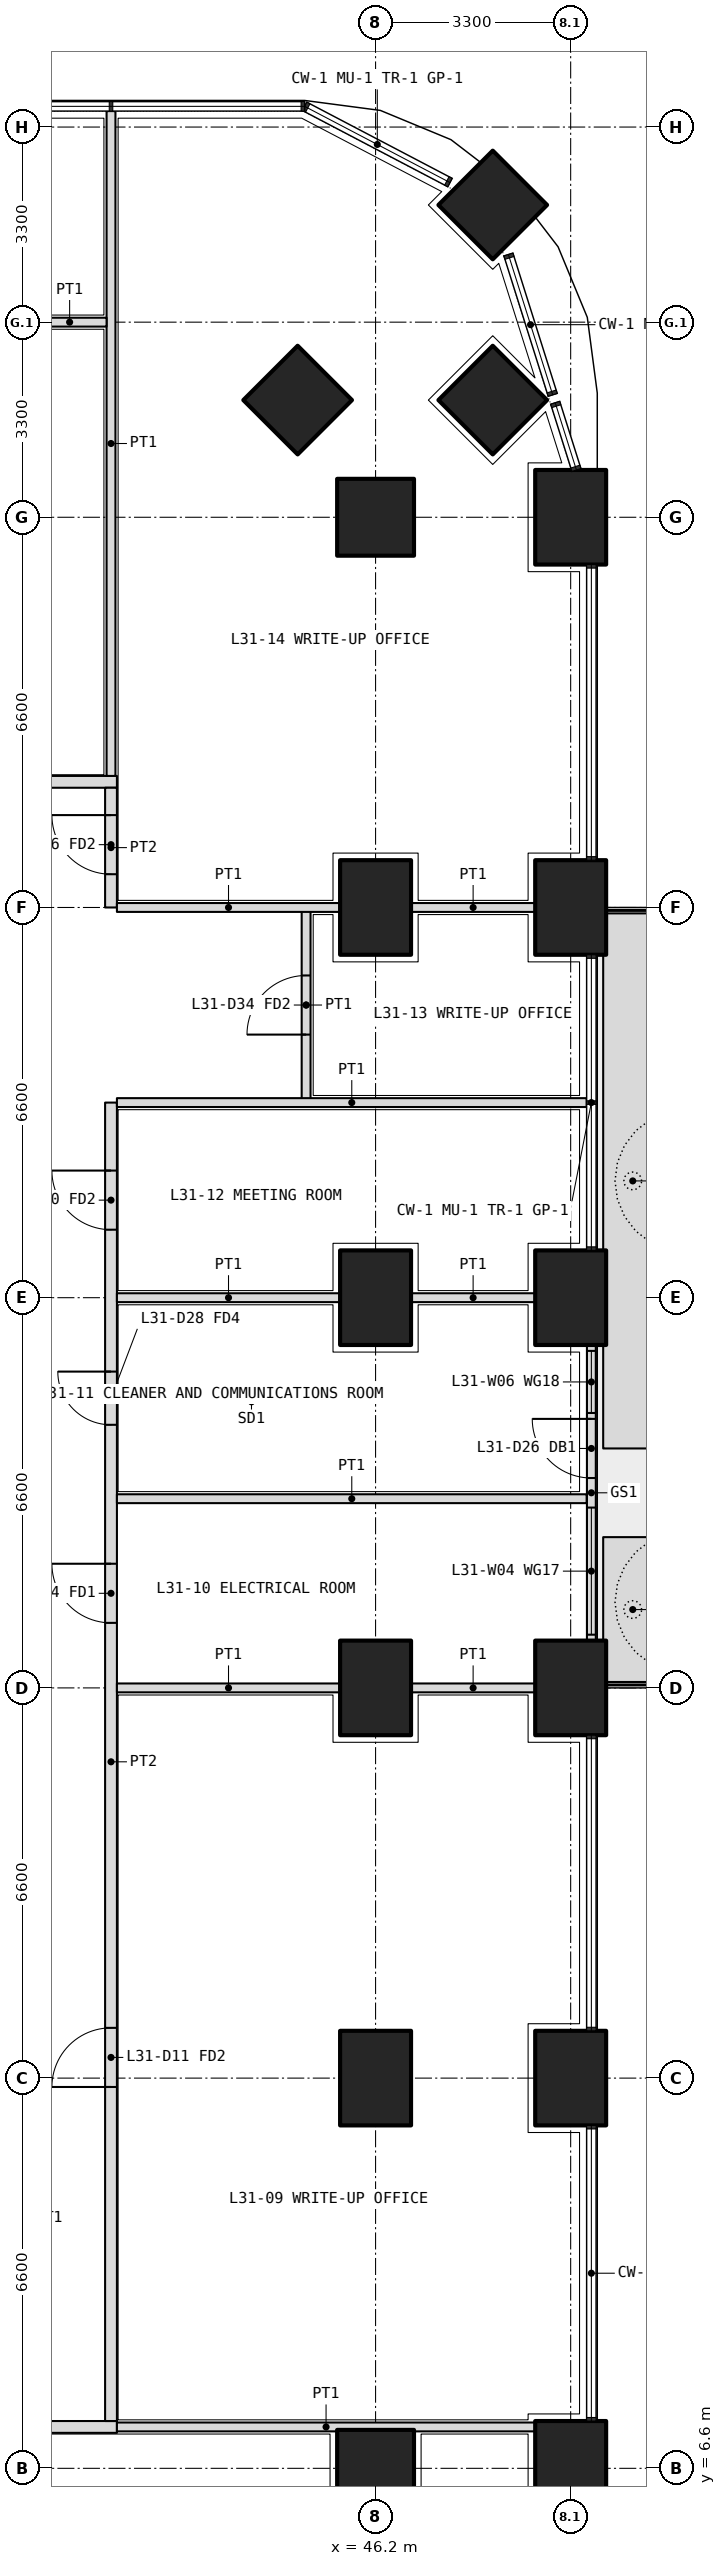
"""IFC4 building model, lengths in metres.
Left out: names, types, materials, properties, quantities, classifications, styles, units other than length and angle.
Written with IfcOpenShell. Run it as: python <this file> out.ifc"""

import sys

from ifc_helpers import new_model, si_unit, direction, frame, frame_2d, origin, origin_2d, place, context, subcontext, project, spatial, polyline, rectangle, outline, extrude, element, fill, save


model = new_model("IFC4")
c1 = context("Model", 3, precision=1e-05, world=origin(), true_north=direction((0.0, 1.0)))
c2 = subcontext(c1, "Body", "Model", "MODEL_VIEW")
j1 = project(units=[si_unit("LENGTHUNIT", "METRE"), si_unit("PLANEANGLEUNIT", "RADIAN")], contexts=[c1])
p1 = place(None, origin())
s1 = spatial("IfcSite", under=j1, at=p1, CompositionType="ELEMENT")
p2 = place(p1, origin())
s2 = spatial("IfcBuilding", under=s1, at=p2, CompositionType="ELEMENT")
p3 = place(p2, frame((0.0, 0.0, 136.8)))
s3 = spatial("IfcBuildingStorey", under=s2, at=p3, CompositionType="ELEMENT", Elevation=136.8)
p4 = place(p3, frame((48.182, 44.882, 0.0), z_axis=(0.0, 0.0, 1.0), x_axis=(0.707106781187, 0.707106781187, 0.0)))
e1 = element("IfcColumn", 1, at=p4, inside=s3, PredefinedType="COLUMN", context=c2, shape_type="SweptSolid", body=[
    extrude(rectangle(XDim=1.3, YDim=1.3, at=origin_2d()), origin(), (0.0, 0.0, 1.0), 4.2),
])
for number, where, z_axis, x_axis in (
    (2, (49.5, 6.6, 0.0), (0.0, 0.0, 1.0), (0.0, 1.0, 0.0)),
    (3, (49.5, 13.2, 0.0), (0.0, 0.0, 1.0), (0.0, 1.0, 0.0)),
    (4, (49.5, 19.8, 0.0), (0.0, 0.0, 1.0), (0.0, 1.0, 0.0)),
    (5, (49.5, 26.4, 0.0), (0.0, 0.0, 1.0), (0.0, 1.0, 0.0)),
    (6, (49.5, 33.0, 0.0), (0.0, 0.0, 1.0), (0.0, 1.0, 0.0)),
    (7, (49.5, 39.6, 0.0), (0.0, 0.0, 1.0), (0.0, 1.0, 0.0)),
):
    element("IfcColumn", number, at=place(p3, frame(where, z_axis=z_axis, x_axis=x_axis)), inside=s3, PredefinedType="COLUMN", context=c2, shape_type="SweptSolid", body=[
        extrude(rectangle(XDim=1.6, YDim=1.2, at=origin_2d()), origin(), (0.0, 0.0, 1.0), 4.2),
    ])
for number, where, z_axis, x_axis in (
    (8, (46.2, 6.6, 0.0), (0.0, 0.0, 1.0), (1.0, 0.0, 0.0)),
    (9, (46.2, 39.6, 0.0), (0.0, 0.0, 1.0), (1.0, 0.0, 0.0)),
    (10, (48.182, 41.582, 0.0), (0.0, 0.0, 1.0), (0.707, 0.707, 0.0)),
    (11, (44.882, 41.582, 0.0), (0.0, 0.0, 1.0), (0.707, 0.707, 0.0)),
):
    element("IfcColumn", number, at=place(p3, frame(where, z_axis=z_axis, x_axis=x_axis)), inside=s3, PredefinedType="COLUMN", context=c2, shape_type="SweptSolid", body=[
        extrude(rectangle(XDim=1.3, YDim=1.3, at=origin_2d()), origin(), (0.0, 0.0, 1.0), 4.2),
    ])
for number, where, z_axis, x_axis in (
    (12, (46.2, 13.2, 0.0), (0.0, 0.0, 1.0), (0.0, 1.0, 0.0)),
    (13, (46.2, 19.8, 0.0), (0.0, 0.0, 1.0), (0.0, 1.0, 0.0)),
    (14, (46.2, 26.4, 0.0), (0.0, 0.0, 1.0), (0.0, 1.0, 0.0)),
    (15, (46.2, 33.0, 0.0), (0.0, 0.0, 1.0), (0.0, 1.0, 0.0)),
):
    element("IfcColumn", number, at=place(p3, frame(where, z_axis=z_axis, x_axis=x_axis)), inside=s3, PredefinedType="COLUMN", context=c2, shape_type="SweptSolid", body=[
        extrude(rectangle(XDim=1.6, YDim=1.2, at=origin_2d()), origin(), (0.0, 0.0, 1.0), 4.2),
    ])
p5 = place(p3, origin())
e16 = element("IfcWall", 16, at=p5, inside=s3, PredefinedType="USERDEFINED", context=c2, shape_type="SweptSolid", body=[
    extrude(outline(polyline([(50.05, 19.9), (51.05, 19.9), (51.05, 22.35), (50.05, 22.35), (50.05, 19.9)]), holes=[polyline([(50.2, 20.05), (50.9, 20.05), (50.9, 22.2), (50.2, 22.2), (50.2, 20.05)])]), origin(), (0.0, 0.0, 1.0), 1.05),
])
p6 = place(p3, origin())
e17 = element("IfcWall", 17, at=p6, inside=s3, PredefinedType="USERDEFINED", context=c2, shape_type="SweptSolid", body=[
    extrude(outline(polyline([(50.05, 23.85), (51.05, 23.85), (51.05, 32.9), (50.05, 32.9), (50.05, 23.85)]), holes=[polyline([(50.2, 24.0), (50.9, 24.0), (50.9, 32.75), (50.2, 32.75), (50.2, 24.0)])]), origin(), (0.0, 0.0, 1.0), 1.05),
])
p7 = place(p3, frame((49.85, 20.6, 0.0), z_axis=(0.0, 0.0, 1.0), x_axis=(0.0, 1.0, 0.0)))
e18 = element("IfcWall", 18, at=p7, inside=s3, PredefinedType="SOLIDWALL", context=c2, shape_type="SweptSolid", body=[
    extrude(rectangle(XDim=5.0, YDim=0.15, at=frame_2d((2.5, 0.0))), origin(), (0.0, 0.0, 1.0), 2.6),
])
p8 = place(p7, frame((2.75, 0.0, 0.0)))
e19 = element("IfcOpeningElement", 19, at=p8, cuts=e18, PredefinedType="OPENING", context=c2, shape_type="SweptSolid", body=[
    extrude(rectangle(XDim=1.0, YDim=2.4, at=frame_2d((0.5, 1.2))), frame((0.0, 0.085, 0.0), z_axis=(0.0, -1.0, 0.0), x_axis=(1.0, 0.0, 0.0)), (0.0, 0.0, 1.0), 0.17),
])
p9 = place(p7, frame((0.1, 0.0, 0.1)))
e20 = element("IfcOpeningElement", 20, at=p9, cuts=e18, PredefinedType="OPENING", context=c2, shape_type="SweptSolid", body=[
    extrude(rectangle(XDim=2.15, YDim=2.2, at=frame_2d((1.075, 1.1))), frame((0.0, 0.085, 0.0), z_axis=(0.0, -1.0, 0.0), x_axis=(1.0, 0.0, 0.0)), (0.0, 0.0, 1.0), 0.17),
])
p10 = place(p7, frame((3.85, 0.0, 0.1)))
e21 = element("IfcOpeningElement", 21, at=p10, cuts=e18, PredefinedType="OPENING", context=c2, shape_type="SweptSolid", body=[
    extrude(rectangle(XDim=1.05, YDim=2.2, at=frame_2d((0.525, 1.1))), frame((0.0, 0.085, 0.0), z_axis=(0.0, -1.0, 0.0), x_axis=(1.0, 0.0, 0.0)), (0.0, 0.0, 1.0), 0.17),
])
p11 = place(p3, frame((10.975, 7.3, 0.0), z_axis=(0.0, 0.0, 1.0), x_axis=(1.0, 0.0, 0.0)))
e22 = element("IfcWall", 22, at=p11, inside=s3, PredefinedType="PARTITIONING", context=c2, shape_type="SweptSolid", body=[
    extrude(rectangle(XDim=30.85, YDim=0.2, at=frame_2d((15.425, 0.0))), origin(), (0.0, 0.0, 1.0), 2.85),
])
p12 = place(p11, frame((3.962, 0.0, 0.0)))
e23 = element("IfcOpeningElement", 23, at=p12, cuts=e22, PredefinedType="OPENING", context=c2, shape_type="SweptSolid", body=[
    extrude(rectangle(XDim=1.0, YDim=2.1, at=frame_2d((0.5, 1.05))), frame((0.0, 0.11, 0.0), z_axis=(0.0, -1.0, 0.0), x_axis=(1.0, 0.0, 0.0)), (0.0, 0.0, 1.0), 0.22),
])
p13 = place(p11, frame((13.275, 0.0, 0.0)))
e24 = element("IfcOpeningElement", 24, at=p13, cuts=e22, PredefinedType="OPENING", context=c2, shape_type="SweptSolid", body=[
    extrude(rectangle(XDim=1.0, YDim=2.1, at=frame_2d((0.5, 1.05))), frame((0.0, 0.11, 0.0), z_axis=(0.0, -1.0, 0.0), x_axis=(1.0, 0.0, 0.0)), (0.0, 0.0, 1.0), 0.22),
])
p14 = place(p11, frame((21.525, 0.0, 0.0)))
e25 = element("IfcOpeningElement", 25, at=p14, cuts=e22, PredefinedType="OPENING", context=c2, shape_type="SweptSolid", body=[
    extrude(rectangle(XDim=1.0, YDim=2.1, at=frame_2d((0.5, 1.05))), frame((0.0, 0.11, 0.0), z_axis=(0.0, -1.0, 0.0), x_axis=(1.0, 0.0, 0.0)), (0.0, 0.0, 1.0), 0.22),
])
p15 = place(p11, frame((27.438, 0.0, 0.0)))
e26 = element("IfcOpeningElement", 26, at=p15, cuts=e22, PredefinedType="OPENING", context=c2, shape_type="SweptSolid", body=[
    extrude(rectangle(XDim=1.2, YDim=2.1, at=frame_2d((0.6, 1.05))), frame((0.0, 0.11, 0.0), z_axis=(0.0, -1.0, 0.0), x_axis=(1.0, 0.0, 0.0)), (0.0, 0.0, 1.0), 0.22),
])
p16 = place(p3, frame((10.975, 35.125, 0.0), z_axis=(0.0, 0.0, 1.0), x_axis=(1.0, 0.0, 0.0)))
e27 = element("IfcWall", 27, at=p16, inside=s3, PredefinedType="PARTITIONING", context=c2, shape_type="SweptSolid", body=[
    extrude(rectangle(XDim=30.85, YDim=0.2, at=frame_2d((15.425, 0.0))), origin(), (0.0, 0.0, 1.0), 2.85),
])
p17 = place(p16, frame((2.312, 0.0, 0.0)))
e28 = element("IfcOpeningElement", 28, at=p17, cuts=e27, PredefinedType="OPENING", context=c2, shape_type="SweptSolid", body=[
    extrude(rectangle(XDim=1.0, YDim=2.1, at=frame_2d((0.5, 1.05))), frame((0.0, 0.11, 0.0), z_axis=(0.0, -1.0, 0.0), x_axis=(1.0, 0.0, 0.0)), (0.0, 0.0, 1.0), 0.22),
])
p18 = place(p16, frame((8.325, 0.0, 0.0)))
e29 = element("IfcOpeningElement", 29, at=p18, cuts=e27, PredefinedType="OPENING", context=c2, shape_type="SweptSolid", body=[
    extrude(rectangle(XDim=1.0, YDim=2.1, at=frame_2d((0.5, 1.05))), frame((0.0, 0.11, 0.0), z_axis=(0.0, -1.0, 0.0), x_axis=(1.0, 0.0, 0.0)), (0.0, 0.0, 1.0), 0.22),
])
p19 = place(p16, frame((13.375, 0.0, 0.0)))
e30 = element("IfcOpeningElement", 30, at=p19, cuts=e27, PredefinedType="OPENING", context=c2, shape_type="SweptSolid", body=[
    extrude(rectangle(XDim=1.0, YDim=2.1, at=frame_2d((0.5, 1.05))), frame((0.0, 0.11, 0.0), z_axis=(0.0, -1.0, 0.0), x_axis=(1.0, 0.0, 0.0)), (0.0, 0.0, 1.0), 0.22),
])
p20 = place(p16, frame((16.675, 0.0, 0.0)))
e31 = element("IfcOpeningElement", 31, at=p20, cuts=e27, PredefinedType="OPENING", context=c2, shape_type="SweptSolid", body=[
    extrude(rectangle(XDim=1.0, YDim=2.1, at=frame_2d((0.5, 1.05))), frame((0.0, 0.11, 0.0), z_axis=(0.0, -1.0, 0.0), x_axis=(1.0, 0.0, 0.0)), (0.0, 0.0, 1.0), 0.22),
])
p21 = place(p16, frame((24.238, 0.0, 0.0)))
e32 = element("IfcOpeningElement", 32, at=p21, cuts=e27, PredefinedType="OPENING", context=c2, shape_type="SweptSolid", body=[
    extrude(rectangle(XDim=1.0, YDim=2.1, at=frame_2d((0.5, 1.05))), frame((0.0, 0.11, 0.0), z_axis=(0.0, -1.0, 0.0), x_axis=(1.0, 0.0, 0.0)), (0.0, 0.0, 1.0), 0.22),
])
p22 = place(p3, frame((41.725, 7.4, 0.0), z_axis=(0.0, 0.0, 1.0), x_axis=(0.0, 1.0, 0.0)))
e33 = element("IfcWall", 33, at=p22, inside=s3, PredefinedType="PARTITIONING", context=c2, shape_type="SweptSolid", body=[
    extrude(rectangle(XDim=22.3, YDim=0.2, at=frame_2d((11.15, 0.0))), origin(), (0.0, 0.0, 1.0), 2.85),
])
p23 = place(p22, frame((5.65, 0.0, 0.0)))
e34 = element("IfcOpeningElement", 34, at=p23, cuts=e33, PredefinedType="OPENING", context=c2, shape_type="SweptSolid", body=[
    extrude(rectangle(XDim=1.0, YDim=2.1, at=frame_2d((0.5, 1.05))), frame((0.0, 0.11, 0.0), z_axis=(0.0, -1.0, 0.0), x_axis=(1.0, 0.0, 0.0)), (0.0, 0.0, 1.0), 0.22),
])
p24 = place(p22, frame((13.5, 0.0, 0.0)))
e35 = element("IfcOpeningElement", 35, at=p24, cuts=e33, PredefinedType="OPENING", context=c2, shape_type="SweptSolid", body=[
    extrude(rectangle(XDim=1.0, YDim=2.1, at=frame_2d((0.5, 1.05))), frame((0.0, 0.11, 0.0), z_axis=(0.0, -1.0, 0.0), x_axis=(1.0, 0.0, 0.0)), (0.0, 0.0, 1.0), 0.22),
])
p25 = place(p22, frame((16.85, 0.0, 0.0)))
e36 = element("IfcOpeningElement", 36, at=p25, cuts=e33, PredefinedType="OPENING", context=c2, shape_type="SweptSolid", body=[
    extrude(rectangle(XDim=0.9, YDim=2.1, at=frame_2d((0.45, 1.05))), frame((0.0, 0.11, 0.0), z_axis=(0.0, -1.0, 0.0), x_axis=(1.0, 0.0, 0.0)), (0.0, 0.0, 1.0), 0.22),
])
p26 = place(p22, frame((20.15, 0.0, 0.0)))
e37 = element("IfcOpeningElement", 37, at=p26, cuts=e33, PredefinedType="OPENING", context=c2, shape_type="SweptSolid", body=[
    extrude(rectangle(XDim=1.0, YDim=2.1, at=frame_2d((0.5, 1.05))), frame((0.0, 0.11, 0.0), z_axis=(0.0, -1.0, 0.0), x_axis=(1.0, 0.0, 0.0)), (0.0, 0.0, 1.0), 0.22),
])
p27 = place(p3, frame((41.725, 33.0, 0.0), z_axis=(0.0, 0.0, 1.0), x_axis=(0.0, 1.0, 0.0)))
e38 = element("IfcWall", 38, at=p27, inside=s3, PredefinedType="PARTITIONING", context=c2, shape_type="SweptSolid", body=[
    extrude(rectangle(XDim=2.025, YDim=0.2, at=frame_2d((1.012, 0.0))), origin(), (0.0, 0.0, 1.0), 2.85),
])
p28 = place(p27, frame((0.562, 0.0, 0.0)))
e39 = element("IfcOpeningElement", 39, at=p28, cuts=e38, PredefinedType="OPENING", context=c2, shape_type="SweptSolid", body=[
    extrude(rectangle(XDim=1.0, YDim=2.1, at=frame_2d((0.5, 1.05))), frame((0.0, 0.11, 0.0), z_axis=(0.0, -1.0, 0.0), x_axis=(1.0, 0.0, 0.0)), (0.0, 0.0, 1.0), 0.22),
])
p29 = place(p3, frame((48.9, 7.3, 0.0), z_axis=(0.0, 0.0, 1.0), x_axis=(-1.0, 0.0, 0.0)))
e40 = element("IfcWall", 40, at=p29, inside=s3, PredefinedType="PARTITIONING", context=c2, shape_type="SweptSolid", body=[
    extrude(rectangle(XDim=7.075, YDim=0.15, at=frame_2d((3.538, 0.0))), origin(), (0.0, 0.0, 1.0), 2.85),
])
p30 = place(p3, frame((41.725, 46.47, 0.0), z_axis=(0.0, 0.0, 1.0), x_axis=(0.0, -1.0, 0.0)))
e41 = element("IfcWall", 41, at=p30, inside=s3, PredefinedType="PARTITIONING", context=c2, shape_type="SweptSolid", body=[
    extrude(rectangle(XDim=11.245, YDim=0.15, at=frame_2d((5.623, 0.0))), origin(), (0.0, 0.0, 1.0), 2.6),
])
p31 = place(p3, frame((49.77, 23.0, 0.0), z_axis=(0.0, 0.0, 1.0), x_axis=(-1.0, 0.0, 0.0)))
e42 = element("IfcWall", 42, at=p31, inside=s3, PredefinedType="PARTITIONING", context=c2, shape_type="SweptSolid", body=[
    extrude(rectangle(XDim=7.945, YDim=0.15, at=frame_2d((3.973, 0.0))), origin(), (0.0, 0.0, 1.0), 2.6),
])
p32 = place(p3, frame((48.9, 26.4, 0.0), z_axis=(0.0, 0.0, 1.0), x_axis=(-1.0, 0.0, 0.0)))
e43 = element("IfcWall", 43, at=p32, inside=s3, PredefinedType="PARTITIONING", context=c2, shape_type="SweptSolid", body=[
    extrude(rectangle(XDim=2.1, YDim=0.15, at=frame_2d((1.05, 0.0))), origin(), (0.0, 0.0, 1.0), 2.85),
])
p33 = place(p3, frame((45.6, 26.4, 0.0), z_axis=(0.0, 0.0, 1.0), x_axis=(-1.0, 0.0, 0.0)))
e44 = element("IfcWall", 44, at=p33, inside=s3, PredefinedType="PARTITIONING", context=c2, shape_type="SweptSolid", body=[
    extrude(rectangle(XDim=3.775, YDim=0.15, at=frame_2d((1.888, 0.0))), origin(), (0.0, 0.0, 1.0), 2.85),
])
p34 = place(p3, frame((45.025, 29.7, 0.0), z_axis=(0.0, 0.0, 1.0), x_axis=(0.0, 1.0, 0.0)))
e45 = element("IfcWall", 45, at=p34, inside=s3, PredefinedType="PARTITIONING", context=c2, shape_type="SweptSolid", body=[
    extrude(rectangle(XDim=3.3, YDim=0.15, at=frame_2d((1.65, 0.0))), origin(), (0.0, 0.0, 1.0), 2.85),
])
p35 = place(p34, frame((1.15, 0.0, 0.0)))
e46 = element("IfcOpeningElement", 46, at=p35, cuts=e45, PredefinedType="OPENING", context=c2, shape_type="SweptSolid", body=[
    extrude(rectangle(XDim=1.0, YDim=2.1, at=frame_2d((0.5, 1.05))), frame((0.0, 0.085, 0.0), z_axis=(0.0, -1.0, 0.0), x_axis=(1.0, 0.0, 0.0)), (0.0, 0.0, 1.0), 0.17),
])
p36 = place(p3, frame((48.9, 19.8, 0.0), z_axis=(0.0, 0.0, 1.0), x_axis=(-1.0, 0.0, 0.0)))
e47 = element("IfcWall", 47, at=p36, inside=s3, PredefinedType="PARTITIONING", context=c2, shape_type="SweptSolid", body=[
    extrude(rectangle(XDim=2.1, YDim=0.15, at=frame_2d((1.05, 0.0))), origin(), (0.0, 0.0, 1.0), 2.85),
])
p37 = place(p3, frame((45.6, 19.8, 0.0), z_axis=(0.0, 0.0, 1.0), x_axis=(-1.0, 0.0, 0.0)))
e48 = element("IfcWall", 48, at=p37, inside=s3, PredefinedType="PARTITIONING", context=c2, shape_type="SweptSolid", body=[
    extrude(rectangle(XDim=3.775, YDim=0.15, at=frame_2d((1.888, 0.0))), origin(), (0.0, 0.0, 1.0), 2.85),
])
p38 = place(p3, frame((49.77, 29.7, 0.0), z_axis=(0.0, 0.0, 1.0), x_axis=(-1.0, 0.0, 0.0)))
e49 = element("IfcWall", 49, at=p38, inside=s3, PredefinedType="PARTITIONING", context=c2, shape_type="SweptSolid", body=[
    extrude(rectangle(XDim=7.945, YDim=0.15, at=frame_2d((3.973, 0.0))), origin(), (0.0, 0.0, 1.0), 2.6),
])
p39 = place(p3, frame((48.9, 33.0, 0.0), z_axis=(0.0, 0.0, 1.0), x_axis=(-1.0, 0.0, 0.0)))
e50 = element("IfcWall", 50, at=p39, inside=s3, PredefinedType="PARTITIONING", context=c2, shape_type="SweptSolid", body=[
    extrude(rectangle(XDim=2.1, YDim=0.15, at=frame_2d((1.05, 0.0))), origin(), (0.0, 0.0, 1.0), 2.85),
])
p40 = place(p3, frame((45.6, 33.0, 0.0), z_axis=(0.0, 0.0, 1.0), x_axis=(-1.0, 0.0, 0.0)))
e51 = element("IfcWall", 51, at=p40, inside=s3, PredefinedType="PARTITIONING", context=c2, shape_type="SweptSolid", body=[
    extrude(rectangle(XDim=3.775, YDim=0.15, at=frame_2d((1.888, 0.0))), origin(), (0.0, 0.0, 1.0), 2.85),
])
p41 = place(p3, frame((41.65, 42.9, 0.0), z_axis=(0.0, 0.0, 1.0), x_axis=(-1.0, 0.0, 0.0)))
e52 = element("IfcWall", 52, at=p41, inside=s3, PredefinedType="PARTITIONING", context=c2, shape_type="SweptSolid", body=[
    extrude(rectangle(XDim=1.25, YDim=0.15, at=frame_2d((0.625, 0.0))), origin(), (0.0, 0.0, 1.0), 2.85),
])
p42 = place(p8, origin())
e53 = element("IfcDoor", 53, at=p42, inside=s3, OperationType="SINGLE_SWING_RIGHT", PredefinedType="DOOR", context=c2, shape_type="SweptSolid", body=[
    extrude(rectangle(XDim=1.0, YDim=2.4, at=frame_2d((0.5, 1.2))), frame((0.0, 0.025, 0.0), z_axis=(0.0, -1.0, 0.0), x_axis=(1.0, 0.0, 0.0)), (0.0, 0.0, 1.0), 0.05),
])
fill(e19, e53)
p43 = place(p9, origin())
e54 = element("IfcWindow", 54, at=p43, inside=s3, PartitioningType="SINGLE_PANEL", PredefinedType="WINDOW", context=c2, shape_type="SweptSolid", body=[
    extrude(rectangle(XDim=2.15, YDim=2.2, at=frame_2d((1.075, 1.1))), frame((0.0, 0.03, 0.0), z_axis=(0.0, -1.0, 0.0), x_axis=(1.0, 0.0, 0.0)), (0.0, 0.0, 1.0), 0.06),
])
fill(e20, e54)
p44 = place(p10, origin())
e55 = element("IfcWindow", 55, at=p44, inside=s3, PartitioningType="SINGLE_PANEL", PredefinedType="WINDOW", context=c2, shape_type="SweptSolid", body=[
    extrude(rectangle(XDim=1.05, YDim=2.2, at=frame_2d((0.525, 1.1))), frame((0.0, 0.03, 0.0), z_axis=(0.0, -1.0, 0.0), x_axis=(1.0, 0.0, 0.0)), (0.0, 0.0, 1.0), 0.06),
])
fill(e21, e55)
p45 = place(p23, origin())
e56 = element("IfcDoor", 56, at=p45, inside=s3, OperationType="SINGLE_SWING_LEFT", PredefinedType="DOOR", context=c2, shape_type="SweptSolid", body=[
    extrude(rectangle(XDim=1.0, YDim=2.1, at=frame_2d((0.5, 1.05))), frame((0.0, 0.025, 0.0), z_axis=(0.0, -1.0, 0.0), x_axis=(1.0, 0.0, 0.0)), (0.0, 0.0, 1.0), 0.05),
])
fill(e34, e56)
p46 = place(p24, origin())
e57 = element("IfcDoor", 57, at=p46, inside=s3, OperationType="SINGLE_SWING_RIGHT", PredefinedType="DOOR", context=c2, shape_type="SweptSolid", body=[
    extrude(rectangle(XDim=1.0, YDim=2.1, at=frame_2d((0.5, 1.05))), frame((0.0, 0.025, 0.0), z_axis=(0.0, -1.0, 0.0), x_axis=(1.0, 0.0, 0.0)), (0.0, 0.0, 1.0), 0.05),
])
fill(e35, e57)
p47 = place(p25, origin())
e58 = element("IfcDoor", 58, at=p47, inside=s3, OperationType="SINGLE_SWING_RIGHT", PredefinedType="DOOR", context=c2, shape_type="SweptSolid", body=[
    extrude(rectangle(XDim=0.9, YDim=2.1, at=frame_2d((0.45, 1.05))), frame((0.0, 0.025, 0.0), z_axis=(0.0, -1.0, 0.0), x_axis=(1.0, 0.0, 0.0)), (0.0, 0.0, 1.0), 0.05),
])
fill(e36, e58)
p48 = place(p26, origin())
e59 = element("IfcDoor", 59, at=p48, inside=s3, OperationType="SINGLE_SWING_RIGHT", PredefinedType="DOOR", context=c2, shape_type="SweptSolid", body=[
    extrude(rectangle(XDim=1.0, YDim=2.1, at=frame_2d((0.5, 1.05))), frame((0.0, 0.025, 0.0), z_axis=(0.0, -1.0, 0.0), x_axis=(1.0, 0.0, 0.0)), (0.0, 0.0, 1.0), 0.05),
])
fill(e37, e59)
p49 = place(p35, origin())
e60 = element("IfcDoor", 60, at=p49, inside=s3, OperationType="SINGLE_SWING_LEFT", PredefinedType="DOOR", context=c2, shape_type="SweptSolid", body=[
    extrude(rectangle(XDim=1.0, YDim=2.1, at=frame_2d((0.5, 1.05))), frame((0.0, 0.025, 0.0), z_axis=(0.0, -1.0, 0.0), x_axis=(1.0, 0.0, 0.0)), (0.0, 0.0, 1.0), 0.05),
])
fill(e46, e60)
p50 = place(p28, origin())
e61 = element("IfcDoor", 61, at=p50, inside=s3, OperationType="SINGLE_SWING_RIGHT", PredefinedType="DOOR", context=c2, shape_type="SweptSolid", body=[
    extrude(rectangle(XDim=1.0, YDim=2.1, at=frame_2d((0.5, 1.05))), frame((0.0, 0.025, 0.0), z_axis=(0.0, -1.0, 0.0), x_axis=(1.0, 0.0, 0.0)), (0.0, 0.0, 1.0), 0.05),
])
fill(e39, e61)
save(model, sys.argv[1])
